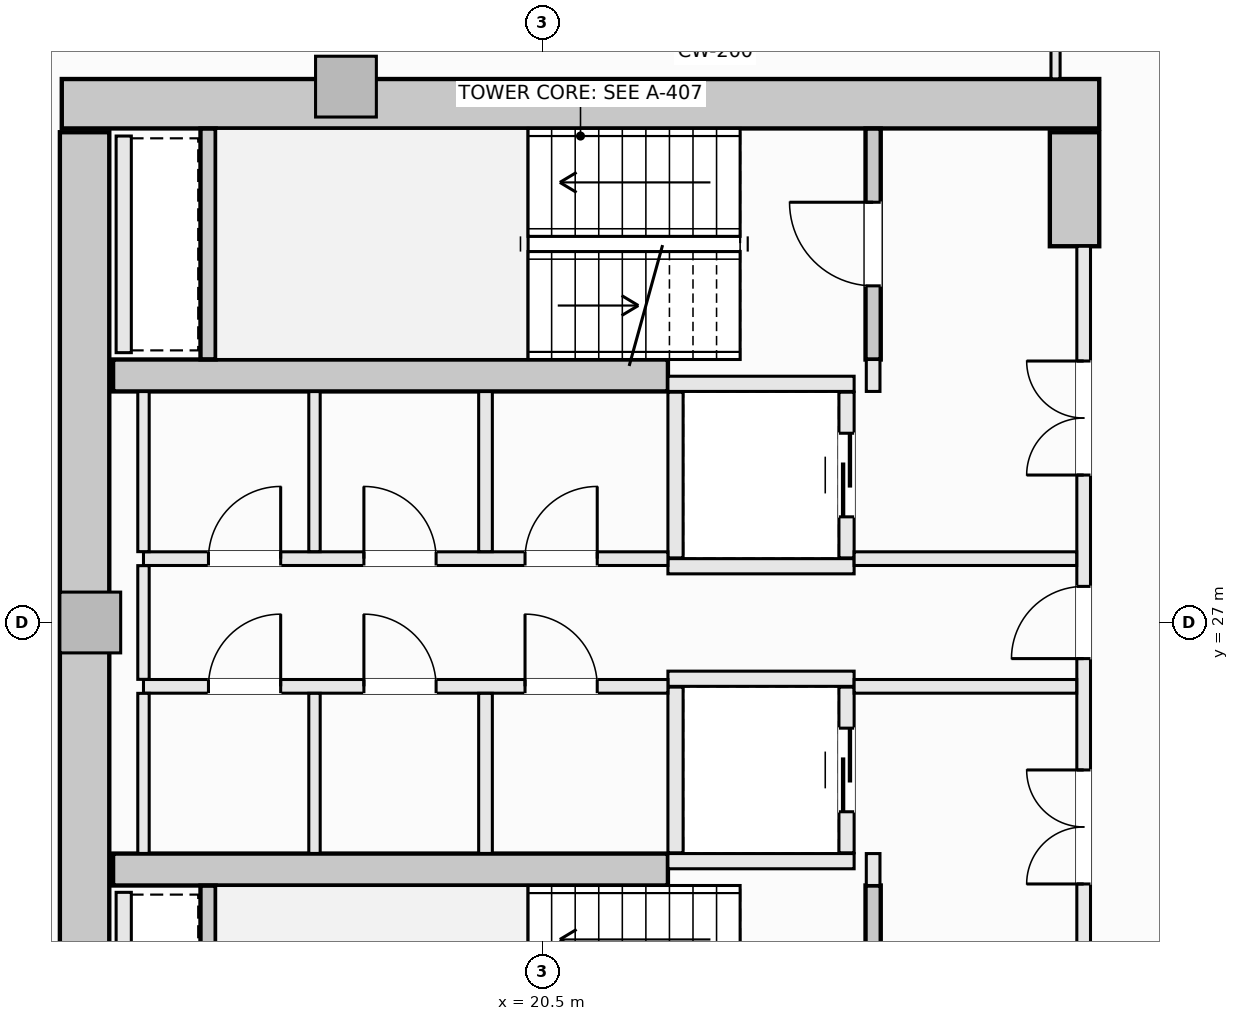
"""IFC4 building model, lengths in metres.
Left out: names, types, materials, properties, quantities, classifications, styles, units other than length and angle.
Written with IfcOpenShell. Run it as: python <this file> out.ifc"""

import sys

from ifc_helpers import new_model, si_unit, direction, frame, frame_2d, origin, origin_2d, place, context, subcontext, project, spatial, rectangle, extrude, element, fill, save


model = new_model("IFC4")
c1 = context("Model", 3, precision=1e-05, world=origin(), true_north=direction((0.0, 1.0)))
c2 = subcontext(c1, "Body", "Model", "MODEL_VIEW")
j1 = project(units=[si_unit("LENGTHUNIT", "METRE"), si_unit("PLANEANGLEUNIT", "RADIAN")], contexts=[c1])
p1 = place(None, origin())
s1 = spatial("IfcSite", under=j1, at=p1, CompositionType="ELEMENT")
p2 = place(p1, origin())
s2 = spatial("IfcBuilding", under=s1, at=p2, CompositionType="ELEMENT")
p3 = place(p2, frame((0.0, 0.0, 135.9)))
s3 = spatial("IfcBuildingStorey", under=s2, at=p3, CompositionType="ELEMENT", Elevation=135.9)
p4 = place(p3, frame((14.175, 33.825, -0.27), z_axis=(0.0, 0.0, 1.0), x_axis=(1.0, 0.0, 0.0)))
e1 = element("IfcWall", 1, at=p4, inside=s3, PredefinedType="SHEAR", context=c2, shape_type="SweptSolid", body=[
    extrude(rectangle(XDim=13.65, YDim=0.65, at=frame_2d((6.825, 0.0))), origin(), (0.0, 0.0, 1.0), 3.4),
])
p5 = place(p3, frame((14.475, 20.55, -0.27), z_axis=(0.0, 0.0, 1.0), x_axis=(0.0, 1.0, 0.0)))
e2 = element("IfcWall", 2, at=p5, inside=s3, PredefinedType="SHEAR", context=c2, shape_type="SweptSolid", body=[
    extrude(rectangle(XDim=12.9, YDim=0.65, at=frame_2d((6.45, 0.0))), origin(), (0.0, 0.0, 1.0), 3.4),
])
p6 = place(p3, frame((27.5, 31.95, -0.27), z_axis=(0.0, 0.0, 1.0), x_axis=(0.0, 1.0, 0.0)))
e3 = element("IfcWall", 3, at=p6, inside=s3, PredefinedType="SHEAR", context=c2, shape_type="SweptSolid", body=[
    extrude(rectangle(XDim=1.5, YDim=0.65, at=frame_2d((0.75, 0.0))), origin(), (0.0, 0.0, 1.0), 3.4),
])
for number, where, z_axis, x_axis in (
    (4, (14.85, 30.25, -0.27), (0.0, 0.0, 1.0), (1.0, 0.0, 0.0)),
    (5, (14.85, 23.75, -0.27), (0.0, 0.0, 1.0), (1.0, 0.0, 0.0)),
):
    element("IfcWall", number, at=place(p3, frame(where, z_axis=z_axis, x_axis=x_axis)), inside=s3, PredefinedType="SHEAR", context=c2, shape_type="SweptSolid", body=[
        extrude(rectangle(XDim=7.3, YDim=0.42, at=frame_2d((3.65, 0.0))), origin(), (0.0, 0.0, 1.0), 3.4),
    ])
for number, where, z_axis, x_axis in (
    (6, (17.914, 34.05, -0.27), (0.0, 0.0, 1.0), (1.0, 0.0, 0.0)),
    (7, (14.55, 27.0, -0.27), (0.0, 0.0, 1.0), (1.0, 0.0, 0.0)),
):
    element("IfcColumn", number, at=place(p3, frame(where, z_axis=z_axis, x_axis=x_axis)), inside=s3, PredefinedType="PILASTER", context=c2, shape_type="SweptSolid", body=[
        extrude(rectangle(XDim=0.8, YDim=0.8, at=origin_2d()), origin(), (0.0, 0.0, 1.0), 3.4),
    ])
p7 = place(p3, frame((24.85, 30.46, -0.27), z_axis=(0.0, 0.0, 1.0), x_axis=(0.0, 1.0, 0.0)))
e8 = element("IfcWall", 8, at=p7, inside=s3, PredefinedType="SHEAR", context=c2, shape_type="SweptSolid", body=[
    extrude(rectangle(XDim=3.038, YDim=0.2, at=frame_2d((1.519, 0.0))), origin(), (0.0, 0.0, 1.0), 3.4),
])
p8 = place(p7, frame((0.969, 0.0, 0.27)))
e9 = element("IfcOpeningElement", 9, at=p8, cuts=e8, PredefinedType="OPENING", context=c2, shape_type="SweptSolid", body=[
    extrude(rectangle(XDim=1.1, YDim=2.15, at=frame_2d((0.55, 1.075))), frame((0.0, 0.11, 0.0), z_axis=(0.0, -1.0, 0.0), x_axis=(1.0, 0.0, 0.0)), (0.0, 0.0, 1.0), 0.22),
])
p9 = place(p3, frame((16.1, 30.462, -0.27), z_axis=(0.0, 0.0, 1.0), x_axis=(0.0, 1.0, 0.0)))
e10 = element("IfcWall", 10, at=p9, inside=s3, PredefinedType="SHEAR", context=c2, shape_type="SweptSolid", body=[
    extrude(rectangle(XDim=3.036, YDim=0.2, at=frame_2d((1.518, 0.0))), origin(), (0.0, 0.0, 1.0), 3.4),
])
p10 = place(p3, frame((24.85, 20.502, -0.27), z_axis=(0.0, 0.0, 1.0), x_axis=(0.0, 1.0, 0.0)))
e11 = element("IfcWall", 11, at=p10, inside=s3, PredefinedType="SHEAR", context=c2, shape_type="SweptSolid", body=[
    extrude(rectangle(XDim=3.038, YDim=0.2, at=frame_2d((1.519, 0.0))), origin(), (0.0, 0.0, 1.0), 3.4),
])
p11 = place(p10, frame((0.969, 0.0, 0.27)))
e12 = element("IfcOpeningElement", 12, at=p11, cuts=e11, PredefinedType="OPENING", context=c2, shape_type="SweptSolid", body=[
    extrude(rectangle(XDim=1.1, YDim=2.15, at=frame_2d((0.55, 1.075))), frame((0.0, 0.11, 0.0), z_axis=(0.0, -1.0, 0.0), x_axis=(1.0, 0.0, 0.0)), (0.0, 0.0, 1.0), 0.22),
])
p12 = place(p3, frame((16.1, 20.502, -0.27), z_axis=(0.0, 0.0, 1.0), x_axis=(0.0, 1.0, 0.0)))
e13 = element("IfcWall", 13, at=p12, inside=s3, PredefinedType="SHEAR", context=c2, shape_type="SweptSolid", body=[
    extrude(rectangle(XDim=3.036, YDim=0.2, at=frame_2d((1.518, 0.0))), origin(), (0.0, 0.0, 1.0), 3.4),
])
for number, where, z_axis, x_axis in (
    (14, (22.15, 30.14, 0.0), (0.0, 0.0, 1.0), (1.0, 0.0, 0.0)),
    (15, (22.15, 27.74, 0.0), (0.0, 0.0, 1.0), (1.0, 0.0, 0.0)),
):
    element("IfcWall", number, at=place(p3, frame(where, z_axis=z_axis, x_axis=x_axis)), inside=s3, PredefinedType="SOLIDWALL", context=c2, shape_type="SweptSolid", body=[
        extrude(rectangle(XDim=2.45, YDim=0.2, at=frame_2d((1.225, 0.0))), origin(), (0.0, 0.0, 1.0), 3.13),
    ])
p13 = place(p3, frame((22.25, 27.85, 0.0), z_axis=(0.0, 0.0, 1.0), x_axis=(0.0, 1.0, 0.0)))
e16 = element("IfcWall", 16, at=p13, inside=s3, PredefinedType="SOLIDWALL", context=c2, shape_type="SweptSolid", body=[
    extrude(rectangle(XDim=2.18, YDim=0.2, at=frame_2d((1.09, 0.0))), origin(), (0.0, 0.0, 1.0), 3.13),
])
p14 = place(p3, frame((24.5, 27.85, 0.0), z_axis=(0.0, 0.0, 1.0), x_axis=(0.0, 1.0, 0.0)))
e17 = element("IfcWall", 17, at=p14, inside=s3, PredefinedType="SOLIDWALL", context=c2, shape_type="SweptSolid", body=[
    extrude(rectangle(XDim=2.18, YDim=0.2, at=frame_2d((1.09, 0.0))), origin(), (0.0, 0.0, 1.0), 3.13),
])
p15 = place(p14, frame((0.54, 0.0, 0.0)))
e18 = element("IfcOpeningElement", 18, at=p15, cuts=e17, PredefinedType="OPENING", context=c2, shape_type="SweptSolid", body=[
    extrude(rectangle(XDim=1.1, YDim=2.2, at=frame_2d((0.55, 1.1))), frame((0.0, 0.11, 0.0), z_axis=(0.0, -1.0, 0.0), x_axis=(1.0, 0.0, 0.0)), (0.0, 0.0, 1.0), 0.22),
])
for number, where, z_axis, x_axis in (
    (19, (22.15, 26.26, 0.0), (0.0, 0.0, 1.0), (1.0, 0.0, 0.0)),
    (20, (22.15, 23.86, 0.0), (0.0, 0.0, 1.0), (1.0, 0.0, 0.0)),
):
    element("IfcWall", number, at=place(p3, frame(where, z_axis=z_axis, x_axis=x_axis)), inside=s3, PredefinedType="SOLIDWALL", context=c2, shape_type="SweptSolid", body=[
        extrude(rectangle(XDim=2.45, YDim=0.2, at=frame_2d((1.225, 0.0))), origin(), (0.0, 0.0, 1.0), 3.13),
    ])
p16 = place(p3, frame((22.25, 23.97, 0.0), z_axis=(0.0, 0.0, 1.0), x_axis=(0.0, 1.0, 0.0)))
e21 = element("IfcWall", 21, at=p16, inside=s3, PredefinedType="SOLIDWALL", context=c2, shape_type="SweptSolid", body=[
    extrude(rectangle(XDim=2.18, YDim=0.2, at=frame_2d((1.09, 0.0))), origin(), (0.0, 0.0, 1.0), 3.13),
])
p17 = place(p3, frame((24.5, 23.97, 0.0), z_axis=(0.0, 0.0, 1.0), x_axis=(0.0, 1.0, 0.0)))
e22 = element("IfcWall", 22, at=p17, inside=s3, PredefinedType="SOLIDWALL", context=c2, shape_type="SweptSolid", body=[
    extrude(rectangle(XDim=2.18, YDim=0.2, at=frame_2d((1.09, 0.0))), origin(), (0.0, 0.0, 1.0), 3.13),
])
p18 = place(p17, frame((0.54, 0.0, 0.0)))
e23 = element("IfcOpeningElement", 23, at=p18, cuts=e22, PredefinedType="OPENING", context=c2, shape_type="SweptSolid", body=[
    extrude(rectangle(XDim=1.1, YDim=2.2, at=frame_2d((0.55, 1.1))), frame((0.0, 0.11, 0.0), z_axis=(0.0, -1.0, 0.0), x_axis=(1.0, 0.0, 0.0)), (0.0, 0.0, 1.0), 0.22),
])
for number, where, z_axis, x_axis in (
    (24, (14.99, 30.55, 0.0), (0.0, 0.0, 1.0), (0.0, 1.0, 0.0)),
    (25, (14.99, 20.6, 0.0), (0.0, 0.0, 1.0), (0.0, 1.0, 0.0)),
):
    element("IfcWall", number, at=place(p3, frame(where, z_axis=z_axis, x_axis=x_axis)), inside=s3, PredefinedType="SOLIDWALL", context=c2, shape_type="SweptSolid", body=[
        extrude(rectangle(XDim=2.85, YDim=0.2, at=frame_2d((1.425, 0.0))), origin(), (0.0, 0.0, 1.0), 3.13),
    ])
for number, where, z_axis, x_axis in (
    (26, (24.85, 23.54, 0.0), (0.0, 0.0, 1.0), (0.0, 1.0, 0.0)),
    (27, (24.85, 30.04, 0.0), (0.0, 0.0, 1.0), (0.0, 1.0, 0.0)),
):
    element("IfcWall", number, at=place(p3, frame(where, z_axis=z_axis, x_axis=x_axis)), inside=s3, PredefinedType="SOLIDWALL", context=c2, shape_type="SweptSolid", body=[
        extrude(rectangle(XDim=0.42, YDim=0.18, at=frame_2d((0.21, 0.0))), origin(), (0.0, 0.0, 1.0), 3.13),
    ])
p19 = place(p3, frame((27.62, 22.05, 0.0), z_axis=(0.0, 0.0, 1.0), x_axis=(0.0, 1.0, 0.0)))
e28 = element("IfcWall", 28, at=p19, inside=s3, PredefinedType="SOLIDWALL", context=c2, shape_type="SweptSolid", body=[
    extrude(rectangle(XDim=9.9, YDim=0.18, at=frame_2d((4.95, 0.0))), origin(), (0.0, 0.0, 1.0), 3.13),
])
p20 = place(p19, frame((4.475, 0.0, 0.0)))
e29 = element("IfcOpeningElement", 29, at=p20, cuts=e28, PredefinedType="OPENING", context=c2, shape_type="SweptSolid", body=[
    extrude(rectangle(XDim=0.95, YDim=2.1, at=frame_2d((0.475, 1.05))), frame((0.0, 0.1, 0.0), z_axis=(0.0, -1.0, 0.0), x_axis=(1.0, 0.0, 0.0)), (0.0, 0.0, 1.0), 0.2),
])
p21 = place(p19, frame((6.89, 0.0, 0.0)))
e30 = element("IfcOpeningElement", 30, at=p21, cuts=e28, PredefinedType="OPENING", context=c2, shape_type="SweptSolid", body=[
    extrude(rectangle(XDim=1.5, YDim=2.2, at=frame_2d((0.75, 1.1))), frame((0.0, 0.1, 0.0), z_axis=(0.0, -1.0, 0.0), x_axis=(1.0, 0.0, 0.0)), (0.0, 0.0, 1.0), 0.2),
])
p22 = place(p19, frame((1.51, 0.0, 0.0)))
e31 = element("IfcOpeningElement", 31, at=p22, cuts=e28, PredefinedType="OPENING", context=c2, shape_type="SweptSolid", body=[
    extrude(rectangle(XDim=1.5, YDim=2.2, at=frame_2d((0.75, 1.1))), frame((0.0, 0.1, 0.0), z_axis=(0.0, -1.0, 0.0), x_axis=(1.0, 0.0, 0.0)), (0.0, 0.0, 1.0), 0.2),
])
p23 = place(p3, frame((15.25, 27.84, 0.0), z_axis=(0.0, 0.0, 1.0), x_axis=(1.0, 0.0, 0.0)))
e32 = element("IfcWall", 32, at=p23, inside=s3, PredefinedType="SOLIDWALL", context=c2, shape_type="SweptSolid", body=[
    extrude(rectangle(XDim=6.9, YDim=0.18, at=frame_2d((3.45, 0.0))), origin(), (0.0, 0.0, 1.0), 3.13),
])
p24 = place(p23, frame((5.02, 0.0, 0.0)))
e33 = element("IfcOpeningElement", 33, at=p24, cuts=e32, PredefinedType="OPENING", context=c2, shape_type="SweptSolid", body=[
    extrude(rectangle(XDim=0.95, YDim=2.1, at=frame_2d((0.475, 1.05))), frame((0.0, 0.1, 0.0), z_axis=(0.0, -1.0, 0.0), x_axis=(1.0, 0.0, 0.0)), (0.0, 0.0, 1.0), 0.2),
])
p25 = place(p23, frame((0.855, 0.0, 0.0)))
e34 = element("IfcOpeningElement", 34, at=p25, cuts=e32, PredefinedType="OPENING", context=c2, shape_type="SweptSolid", body=[
    extrude(rectangle(XDim=0.95, YDim=2.1, at=frame_2d((0.475, 1.05))), frame((0.0, 0.1, 0.0), z_axis=(0.0, -1.0, 0.0), x_axis=(1.0, 0.0, 0.0)), (0.0, 0.0, 1.0), 0.2),
])
p26 = place(p23, frame((2.9, 0.0, 0.0)))
e35 = element("IfcOpeningElement", 35, at=p26, cuts=e32, PredefinedType="OPENING", context=c2, shape_type="SweptSolid", body=[
    extrude(rectangle(XDim=0.95, YDim=2.1, at=frame_2d((0.475, 1.05))), frame((0.0, 0.1, 0.0), z_axis=(0.0, -1.0, 0.0), x_axis=(1.0, 0.0, 0.0)), (0.0, 0.0, 1.0), 0.2),
])
p27 = place(p3, frame((24.6, 27.84, 0.0), z_axis=(0.0, 0.0, 1.0), x_axis=(1.0, 0.0, 0.0)))
e36 = element("IfcWall", 36, at=p27, inside=s3, PredefinedType="SOLIDWALL", context=c2, shape_type="SweptSolid", body=[
    extrude(rectangle(XDim=2.928, YDim=0.18, at=frame_2d((1.464, 0.0))), origin(), (0.0, 0.0, 1.0), 3.13),
])
p28 = place(p3, frame((15.25, 26.16, 0.0), z_axis=(0.0, 0.0, 1.0), x_axis=(1.0, 0.0, 0.0)))
e37 = element("IfcWall", 37, at=p28, inside=s3, PredefinedType="SOLIDWALL", context=c2, shape_type="SweptSolid", body=[
    extrude(rectangle(XDim=6.9, YDim=0.18, at=frame_2d((3.45, 0.0))), origin(), (0.0, 0.0, 1.0), 3.13),
])
p29 = place(p28, frame((5.02, 0.0, 0.0)))
e38 = element("IfcOpeningElement", 38, at=p29, cuts=e37, PredefinedType="OPENING", context=c2, shape_type="SweptSolid", body=[
    extrude(rectangle(XDim=0.95, YDim=2.1, at=frame_2d((0.475, 1.05))), frame((0.0, 0.1, 0.0), z_axis=(0.0, -1.0, 0.0), x_axis=(1.0, 0.0, 0.0)), (0.0, 0.0, 1.0), 0.2),
])
p30 = place(p28, frame((0.855, 0.0, 0.0)))
e39 = element("IfcOpeningElement", 39, at=p30, cuts=e37, PredefinedType="OPENING", context=c2, shape_type="SweptSolid", body=[
    extrude(rectangle(XDim=0.95, YDim=2.1, at=frame_2d((0.475, 1.05))), frame((0.0, 0.1, 0.0), z_axis=(0.0, -1.0, 0.0), x_axis=(1.0, 0.0, 0.0)), (0.0, 0.0, 1.0), 0.2),
])
p31 = place(p28, frame((2.9, 0.0, 0.0)))
e40 = element("IfcOpeningElement", 40, at=p31, cuts=e37, PredefinedType="OPENING", context=c2, shape_type="SweptSolid", body=[
    extrude(rectangle(XDim=0.95, YDim=2.1, at=frame_2d((0.475, 1.05))), frame((0.0, 0.1, 0.0), z_axis=(0.0, -1.0, 0.0), x_axis=(1.0, 0.0, 0.0)), (0.0, 0.0, 1.0), 0.2),
])
p32 = place(p3, frame((24.6, 26.16, 0.0), z_axis=(0.0, 0.0, 1.0), x_axis=(1.0, 0.0, 0.0)))
e41 = element("IfcWall", 41, at=p32, inside=s3, PredefinedType="SOLIDWALL", context=c2, shape_type="SweptSolid", body=[
    extrude(rectangle(XDim=2.928, YDim=0.18, at=frame_2d((1.464, 0.0))), origin(), (0.0, 0.0, 1.0), 3.13),
])
p33 = place(p3, frame((15.25, 23.962, 0.0), z_axis=(0.0, 0.0, 1.0), x_axis=(0.0, 1.0, 0.0)))
e42 = element("IfcWall", 42, at=p33, inside=s3, PredefinedType="PARTITIONING", context=c2, shape_type="SweptSolid", body=[
    extrude(rectangle(XDim=2.106, YDim=0.15, at=frame_2d((1.053, 0.0))), origin(), (0.0, 0.0, 1.0), 3.13),
])
p34 = place(p3, frame((15.25, 26.252, 0.0), z_axis=(0.0, 0.0, 1.0), x_axis=(0.0, 1.0, 0.0)))
e43 = element("IfcWall", 43, at=p34, inside=s3, PredefinedType="PARTITIONING", context=c2, shape_type="SweptSolid", body=[
    extrude(rectangle(XDim=1.496, YDim=0.15, at=frame_2d((0.748, 0.0))), origin(), (0.0, 0.0, 1.0), 3.13),
])
p35 = place(p3, frame((15.25, 27.932, 0.0), z_axis=(0.0, 0.0, 1.0), x_axis=(0.0, 1.0, 0.0)))
e44 = element("IfcWall", 44, at=p35, inside=s3, PredefinedType="PARTITIONING", context=c2, shape_type="SweptSolid", body=[
    extrude(rectangle(XDim=2.106, YDim=0.15, at=frame_2d((1.053, 0.0))), origin(), (0.0, 0.0, 1.0), 3.13),
])
for number, where, z_axis, x_axis in (
    (45, (19.75, 23.962, 0.0), (0.0, 0.0, 1.0), (0.0, 1.0, 0.0)),
    (46, (19.75, 27.932, 0.0), (0.0, 0.0, 1.0), (0.0, 1.0, 0.0)),
):
    element("IfcWall", number, at=place(p3, frame(where, z_axis=z_axis, x_axis=x_axis)), inside=s3, PredefinedType="SOLIDWALL", context=c2, shape_type="SweptSolid", body=[
        extrude(rectangle(XDim=2.106, YDim=0.18, at=frame_2d((1.053, 0.0))), origin(), (0.0, 0.0, 1.0), 3.13),
    ])
for number, where, z_axis, x_axis in (
    (47, (17.5, 23.962, 0.0), (0.0, 0.0, 1.0), (0.0, 1.0, 0.0)),
    (48, (17.5, 27.932, 0.0), (0.0, 0.0, 1.0), (0.0, 1.0, 0.0)),
):
    element("IfcWall", number, at=place(p3, frame(where, z_axis=z_axis, x_axis=x_axis)), inside=s3, PredefinedType="PARTITIONING", context=c2, shape_type="SweptSolid", body=[
        extrude(rectangle(XDim=2.106, YDim=0.15, at=frame_2d((1.053, 0.0))), origin(), (0.0, 0.0, 1.0), 3.13),
    ])
p36 = place(p3, frame((27.25, 34.152, 0.0), z_axis=(0.0, 0.0, 1.0), x_axis=(0.0, 1.0, 0.0)))
e49 = element("IfcWall", 49, at=p36, inside=s3, PredefinedType="PARTITIONING", context=c2, shape_type="SweptSolid", body=[
    extrude(rectangle(XDim=0.806, YDim=0.12, at=frame_2d((0.403, 0.0))), origin(), (0.0, 0.0, 1.0), 3.13),
])
p37 = place(p8, origin())
e50 = element("IfcDoor", 50, at=p37, inside=s3, OperationType="SINGLE_SWING_RIGHT", PredefinedType="DOOR", context=c2, shape_type="SweptSolid", body=[
    extrude(rectangle(XDim=1.1, YDim=2.15, at=frame_2d((0.55, 1.075))), frame((0.0, 0.025, 0.0), z_axis=(0.0, -1.0, 0.0), x_axis=(1.0, 0.0, 0.0)), (0.0, 0.0, 1.0), 0.05),
])
fill(e9, e50)
p38 = place(p15, origin())
e51 = element("IfcDoor", 51, at=p38, inside=s3, OperationType="SLIDING_TO_LEFT", PredefinedType="DOOR", context=c2, shape_type="SweptSolid", body=[
    extrude(rectangle(XDim=1.1, YDim=2.2, at=frame_2d((0.55, 1.1))), frame((0.0, 0.025, 0.0), z_axis=(0.0, -1.0, 0.0), x_axis=(1.0, 0.0, 0.0)), (0.0, 0.0, 1.0), 0.05),
])
fill(e18, e51)
p39 = place(p18, origin())
e52 = element("IfcDoor", 52, at=p39, inside=s3, OperationType="SLIDING_TO_LEFT", PredefinedType="DOOR", context=c2, shape_type="SweptSolid", body=[
    extrude(rectangle(XDim=1.1, YDim=2.2, at=frame_2d((0.55, 1.1))), frame((0.0, 0.025, 0.0), z_axis=(0.0, -1.0, 0.0), x_axis=(1.0, 0.0, 0.0)), (0.0, 0.0, 1.0), 0.05),
])
fill(e23, e52)
p40 = place(p20, origin())
e53 = element("IfcDoor", 53, at=p40, inside=s3, OperationType="SINGLE_SWING_LEFT", PredefinedType="DOOR", context=c2, shape_type="SweptSolid", body=[
    extrude(rectangle(XDim=0.95, YDim=2.1, at=frame_2d((0.475, 1.05))), frame((0.0, 0.025, 0.0), z_axis=(0.0, -1.0, 0.0), x_axis=(1.0, 0.0, 0.0)), (0.0, 0.0, 1.0), 0.05),
])
fill(e29, e53)
p41 = place(p21, origin())
e54 = element("IfcDoor", 54, at=p41, inside=s3, OperationType="DOUBLE_DOOR_SINGLE_SWING", PredefinedType="DOOR", context=c2, shape_type="SweptSolid", body=[
    extrude(rectangle(XDim=1.5, YDim=2.2, at=frame_2d((0.75, 1.1))), frame((0.0, 0.025, 0.0), z_axis=(0.0, -1.0, 0.0), x_axis=(1.0, 0.0, 0.0)), (0.0, 0.0, 1.0), 0.05),
])
fill(e30, e54)
p42 = place(p22, origin())
e55 = element("IfcDoor", 55, at=p42, inside=s3, OperationType="DOUBLE_DOOR_SINGLE_SWING", PredefinedType="DOOR", context=c2, shape_type="SweptSolid", body=[
    extrude(rectangle(XDim=1.5, YDim=2.2, at=frame_2d((0.75, 1.1))), frame((0.0, 0.025, 0.0), z_axis=(0.0, -1.0, 0.0), x_axis=(1.0, 0.0, 0.0)), (0.0, 0.0, 1.0), 0.05),
])
fill(e31, e55)
p43 = place(p24, origin())
e56 = element("IfcDoor", 56, at=p43, inside=s3, OperationType="SINGLE_SWING_RIGHT", PredefinedType="DOOR", context=c2, shape_type="SweptSolid", body=[
    extrude(rectangle(XDim=0.95, YDim=2.1, at=frame_2d((0.475, 1.05))), frame((0.0, 0.025, 0.0), z_axis=(0.0, -1.0, 0.0), x_axis=(1.0, 0.0, 0.0)), (0.0, 0.0, 1.0), 0.05),
])
fill(e33, e56)
p44 = place(p29, origin())
e57 = element("IfcDoor", 57, at=p44, inside=s3, OperationType="SINGLE_SWING_LEFT", PredefinedType="DOOR", context=c2, shape_type="SweptSolid", body=[
    extrude(rectangle(XDim=0.95, YDim=2.1, at=frame_2d((0.475, 1.05))), frame((0.0, 0.025, 0.0), z_axis=(0.0, -1.0, 0.0), x_axis=(1.0, 0.0, 0.0)), (0.0, 0.0, 1.0), 0.05),
])
fill(e38, e57)
p45 = place(p25, origin())
e58 = element("IfcDoor", 58, at=p45, inside=s3, OperationType="SINGLE_SWING_RIGHT", PredefinedType="DOOR", context=c2, shape_type="SweptSolid", body=[
    extrude(rectangle(XDim=0.95, YDim=2.1, at=frame_2d((0.475, 1.05))), frame((0.0, 0.025, 0.0), z_axis=(0.0, -1.0, 0.0), x_axis=(1.0, 0.0, 0.0)), (0.0, 0.0, 1.0), 0.05),
])
fill(e34, e58)
p46 = place(p26, origin())
e59 = element("IfcDoor", 59, at=p46, inside=s3, OperationType="SINGLE_SWING_LEFT", PredefinedType="DOOR", context=c2, shape_type="SweptSolid", body=[
    extrude(rectangle(XDim=0.95, YDim=2.1, at=frame_2d((0.475, 1.05))), frame((0.0, 0.025, 0.0), z_axis=(0.0, -1.0, 0.0), x_axis=(1.0, 0.0, 0.0)), (0.0, 0.0, 1.0), 0.05),
])
fill(e35, e59)
p47 = place(p30, origin())
e60 = element("IfcDoor", 60, at=p47, inside=s3, OperationType="SINGLE_SWING_RIGHT", PredefinedType="DOOR", context=c2, shape_type="SweptSolid", body=[
    extrude(rectangle(XDim=0.95, YDim=2.1, at=frame_2d((0.475, 1.05))), frame((0.0, 0.025, 0.0), z_axis=(0.0, -1.0, 0.0), x_axis=(1.0, 0.0, 0.0)), (0.0, 0.0, 1.0), 0.05),
])
fill(e39, e60)
p48 = place(p31, origin())
e61 = element("IfcDoor", 61, at=p48, inside=s3, OperationType="SINGLE_SWING_LEFT", PredefinedType="DOOR", context=c2, shape_type="SweptSolid", body=[
    extrude(rectangle(XDim=0.95, YDim=2.1, at=frame_2d((0.475, 1.05))), frame((0.0, 0.025, 0.0), z_axis=(0.0, -1.0, 0.0), x_axis=(1.0, 0.0, 0.0)), (0.0, 0.0, 1.0), 0.05),
])
fill(e40, e61)
save(model, sys.argv[1])
